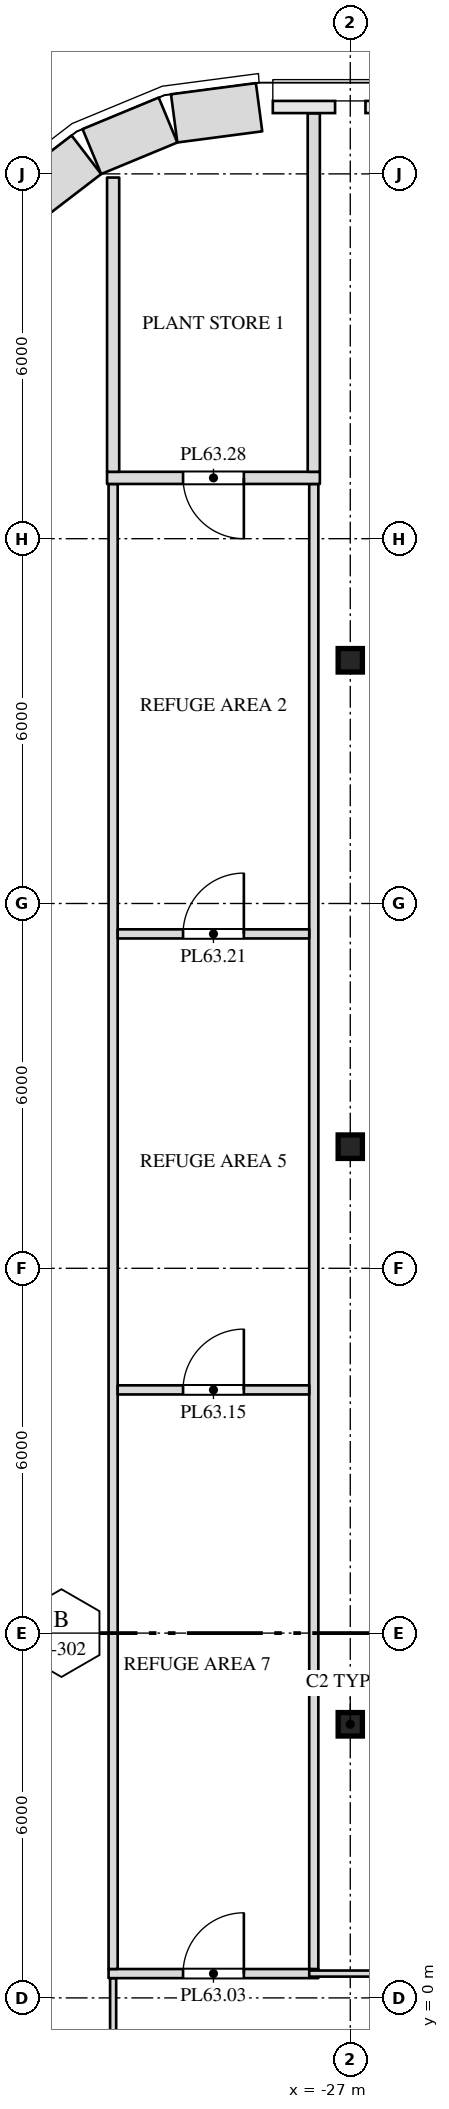
"""IFC4 building model, lengths in metres.
Left out: names, types, materials, properties, quantities, classifications, styles, units other than length and angle.
Written with IfcOpenShell. Run it as: python <this file> out.ifc"""

import sys

from ifc_helpers import new_model, si_unit, direction, frame, frame_2d, origin, origin_2d, place, context, subcontext, project, spatial, rectangle, i_section, extrude, element, fill, save


model = new_model("IFC4")
c1 = context("Model", 3, precision=1e-05, world=origin(), true_north=direction((0.0, 1.0)))
c2 = subcontext(c1, "Body", "Model", "MODEL_VIEW")
j1 = project(units=[si_unit("LENGTHUNIT", "METRE"), si_unit("PLANEANGLEUNIT", "RADIAN")], contexts=[c1])
p1 = place(None, origin())
s1 = spatial("IfcSite", under=j1, at=p1, CompositionType="ELEMENT")
p2 = place(p1, origin())
s2 = spatial("IfcBuilding", under=s1, at=p2, CompositionType="ELEMENT")
p3 = place(p2, frame((0.0, 0.0, 268.5)))
s3 = spatial("IfcBuildingStorey", under=s2, at=p3, CompositionType="ELEMENT", Elevation=268.5)
for number, where, z_axis, x_axis in (
    (1, (-27.0, 4.5, 0.0), (0.0, 0.0, 1.0), (1.0, 0.0, 0.0)),
    (2, (-27.0, 14.0, 0.0), (0.0, 0.0, 1.0), (1.0, 0.0, 0.0)),
    (3, (-27.0, 22.0, 0.0), (0.0, 0.0, 1.0), (1.0, 0.0, 0.0)),
):
    element("IfcColumn", number, at=place(p3, frame(where, z_axis=z_axis, x_axis=x_axis)), inside=s3, PredefinedType="COLUMN", context=c2, shape_type="SweptSolid", body=[
        extrude(i_section(OverallWidth=0.399, OverallDepth=0.386, WebThickness=0.021, FlangeThickness=0.033, at=origin_2d()), origin(), (0.0, 0.0, 1.0), 4.0),
    ])
p4 = place(p3, frame((-30.9, -1.925, 0.0), z_axis=(0.0, 0.0, 1.0), x_axis=(0.0, 1.0, 0.0)))
e4 = element("IfcWall", 4, at=p4, inside=s3, PredefinedType="PARTITIONING", context=c2, shape_type="SweptSolid", body=[
    extrude(rectangle(XDim=2.25, YDim=0.1, at=frame_2d((1.125, 0.0))), origin(), (0.0, 0.0, 1.0), 3.78),
])
p5 = place(p3, frame((-30.975, 0.4, 0.0), z_axis=(0.0, 0.0, 1.0), x_axis=(1.0, 0.0, 0.0)))
e5 = element("IfcWall", 5, at=p5, inside=s3, PredefinedType="PARTITIONING", context=c2, shape_type="SweptSolid", body=[
    extrude(rectangle(XDim=3.45, YDim=0.15, at=frame_2d((1.725, 0.0))), origin(), (0.0, 0.0, 1.0), 3.78),
])
p6 = place(p5, frame((1.225, 0.0, 0.0)))
e6 = element("IfcOpeningElement", 6, at=p6, cuts=e5, PredefinedType="OPENING", context=c2, shape_type="SweptSolid", body=[
    extrude(rectangle(XDim=1.0, YDim=2.1, at=frame_2d((0.5, 1.05))), frame((0.0, 0.087, 0.0), z_axis=(0.0, -1.0, 0.0), x_axis=(1.0, 0.0, 0.0)), (0.0, 0.0, 1.0), 0.174),
])
p7 = place(p3, frame((-30.9, 0.475, 0.0), z_axis=(0.0, 0.0, 1.0), x_axis=(0.0, 1.0, 0.0)))
e7 = element("IfcWall", 7, at=p7, inside=s3, PredefinedType="PARTITIONING", context=c2, shape_type="SweptSolid", body=[
    extrude(rectangle(XDim=24.425, YDim=0.15, at=frame_2d((12.212, 0.0))), origin(), (0.0, 0.0, 1.0), 3.78),
])
p8 = place(p3, frame((-27.675, 0.4, 0.0), z_axis=(0.0, 0.0, 1.0), x_axis=(1.0, 0.0, 0.0)))
e8 = element("IfcWall", 8, at=p8, inside=s3, PredefinedType="PARTITIONING", context=c2, shape_type="SweptSolid", body=[
    extrude(rectangle(XDim=1.435, YDim=0.1, at=frame_2d((0.718, 0.0))), origin(), (0.0, 0.0, 1.0), 3.78),
])
p9 = place(p3, frame((-27.6, 0.475, 0.0), z_axis=(0.0, 0.0, 1.0), x_axis=(0.0, 1.0, 0.0)))
e9 = element("IfcWall", 9, at=p9, inside=s3, PredefinedType="PARTITIONING", context=c2, shape_type="SweptSolid", body=[
    extrude(rectangle(XDim=24.425, YDim=0.15, at=frame_2d((12.212, 0.0))), origin(), (0.0, 0.0, 1.0), 3.78),
])
p10 = place(p3, frame((-30.825, 10.0, 0.0), z_axis=(0.0, 0.0, 1.0), x_axis=(1.0, 0.0, 0.0)))
e10 = element("IfcWall", 10, at=p10, inside=s3, PredefinedType="PARTITIONING", context=c2, shape_type="SweptSolid", body=[
    extrude(rectangle(XDim=3.15, YDim=0.15, at=frame_2d((1.575, 0.0))), origin(), (0.0, 0.0, 1.0), 3.78),
])
p11 = place(p10, frame((1.075, 0.0, 0.0)))
e11 = element("IfcOpeningElement", 11, at=p11, cuts=e10, PredefinedType="OPENING", context=c2, shape_type="SweptSolid", body=[
    extrude(rectangle(XDim=1.0, YDim=2.1, at=frame_2d((0.5, 1.05))), frame((0.0, 0.087, 0.0), z_axis=(0.0, -1.0, 0.0), x_axis=(1.0, 0.0, 0.0)), (0.0, 0.0, 1.0), 0.174),
])
p12 = place(p3, frame((-30.825, 17.5, 0.0), z_axis=(0.0, 0.0, 1.0), x_axis=(1.0, 0.0, 0.0)))
e12 = element("IfcWall", 12, at=p12, inside=s3, PredefinedType="PARTITIONING", context=c2, shape_type="SweptSolid", body=[
    extrude(rectangle(XDim=3.15, YDim=0.15, at=frame_2d((1.575, 0.0))), origin(), (0.0, 0.0, 1.0), 3.78),
])
p13 = place(p12, frame((1.075, 0.0, 0.0)))
e13 = element("IfcOpeningElement", 13, at=p13, cuts=e12, PredefinedType="OPENING", context=c2, shape_type="SweptSolid", body=[
    extrude(rectangle(XDim=1.0, YDim=2.1, at=frame_2d((0.5, 1.05))), frame((0.0, 0.087, 0.0), z_axis=(0.0, -1.0, 0.0), x_axis=(1.0, 0.0, 0.0)), (0.0, 0.0, 1.0), 0.174),
])
p14 = place(p3, frame((-31.0, 25.0, 0.0), z_axis=(0.0, 0.0, 1.0), x_axis=(1.0, 0.0, 0.0)))
e14 = element("IfcWall", 14, at=p14, inside=s3, PredefinedType="PARTITIONING", context=c2, shape_type="SweptSolid", body=[
    extrude(rectangle(XDim=3.5, YDim=0.2, at=frame_2d((1.75, 0.0))), origin(), (0.0, 0.0, 1.0), 3.78),
])
p15 = place(p14, frame((1.25, 0.0, 0.0)))
e15 = element("IfcOpeningElement", 15, at=p15, cuts=e14, PredefinedType="OPENING", context=c2, shape_type="SweptSolid", body=[
    extrude(rectangle(XDim=1.0, YDim=2.1, at=frame_2d((0.5, 1.05))), frame((0.0, 0.112, 0.0), z_axis=(0.0, -1.0, 0.0), x_axis=(1.0, 0.0, 0.0)), (0.0, 0.0, 1.0), 0.224),
])
p16 = place(p3, frame((-30.9, 25.1, 0.0), z_axis=(0.0, 0.0, 1.0), x_axis=(0.0, 1.0, 0.0)))
e16 = element("IfcWall", 16, at=p16, inside=s3, PredefinedType="PARTITIONING", context=c2, shape_type="SweptSolid", body=[
    extrude(rectangle(XDim=4.84, YDim=0.2, at=frame_2d((2.42, 0.0))), origin(), (0.0, 0.0, 1.0), 3.78),
])
p17 = place(p3, frame((-27.6, 25.1, 0.0), z_axis=(0.0, 0.0, 1.0), x_axis=(0.0, 1.0, 0.0)))
e17 = element("IfcWall", 17, at=p17, inside=s3, PredefinedType="PARTITIONING", context=c2, shape_type="SweptSolid", body=[
    extrude(rectangle(XDim=5.896, YDim=0.2, at=frame_2d((2.948, 0.0))), origin(), (0.0, 0.0, 1.0), 3.78),
])
p18 = place(p3, frame((-28.5, 31.097, 0.0), z_axis=(0.0, 0.0, 1.0), x_axis=(-0.99144603414, -0.130517283865, 0.0)))
e18 = element("IfcWall", 18, at=p18, inside=s3, PredefinedType="SOLIDWALL", context=c2, shape_type="SweptSolid", body=[
    extrude(rectangle(XDim=1.408, YDim=0.8, at=frame_2d((0.704, 0.0))), origin(), (0.0, 0.0, 1.0), 3.78),
])
p19 = place(p3, frame((-29.997, 30.886, 0.0), z_axis=(0.0, 0.0, 1.0), x_axis=(-0.923847774587, -0.38276009378, 0.0)))
e19 = element("IfcWall", 19, at=p19, inside=s3, PredefinedType="SOLIDWALL", context=c2, shape_type="SweptSolid", body=[
    extrude(rectangle(XDim=1.355, YDim=0.8, at=frame_2d((0.678, 0.0))), origin(), (0.0, 0.0, 1.0), 3.78),
])
p20 = place(p3, frame((-31.34, 30.315, 0.0), z_axis=(0.0, 0.0, 1.0), x_axis=(-0.793272915452, -0.608866226366, 0.0)))
e20 = element("IfcWall", 20, at=p20, inside=s3, PredefinedType="SOLIDWALL", context=c2, shape_type="SweptSolid", body=[
    extrude(rectangle(XDim=1.356, YDim=0.8, at=frame_2d((0.678, 0.0))), origin(), (0.0, 0.0, 1.0), 3.78),
])
p21 = place(p6, origin())
e21 = element("IfcDoor", 21, at=p21, inside=s3, OperationType="SINGLE_SWING_RIGHT", PredefinedType="DOOR", context=c2, shape_type="SweptSolid", body=[
    extrude(rectangle(XDim=1.0, YDim=2.1, at=frame_2d((0.5, 1.05))), frame((0.0, 0.025, 0.0), z_axis=(0.0, -1.0, 0.0), x_axis=(1.0, 0.0, 0.0)), (0.0, 0.0, 1.0), 0.05),
])
fill(e6, e21)
p22 = place(p11, origin())
e22 = element("IfcDoor", 22, at=p22, inside=s3, OperationType="SINGLE_SWING_RIGHT", PredefinedType="DOOR", context=c2, shape_type="SweptSolid", body=[
    extrude(rectangle(XDim=1.0, YDim=2.1, at=frame_2d((0.5, 1.05))), frame((0.0, 0.025, 0.0), z_axis=(0.0, -1.0, 0.0), x_axis=(1.0, 0.0, 0.0)), (0.0, 0.0, 1.0), 0.05),
])
fill(e11, e22)
p23 = place(p13, origin())
e23 = element("IfcDoor", 23, at=p23, inside=s3, OperationType="SINGLE_SWING_RIGHT", PredefinedType="DOOR", context=c2, shape_type="SweptSolid", body=[
    extrude(rectangle(XDim=1.0, YDim=2.1, at=frame_2d((0.5, 1.05))), frame((0.0, 0.025, 0.0), z_axis=(0.0, -1.0, 0.0), x_axis=(1.0, 0.0, 0.0)), (0.0, 0.0, 1.0), 0.05),
])
fill(e13, e23)
p24 = place(p15, origin())
e24 = element("IfcDoor", 24, at=p24, inside=s3, OperationType="SINGLE_SWING_LEFT", PredefinedType="DOOR", context=c2, shape_type="SweptSolid", body=[
    extrude(rectangle(XDim=1.0, YDim=2.1, at=frame_2d((0.5, 1.05))), frame((0.0, 0.025, 0.0), z_axis=(0.0, -1.0, 0.0), x_axis=(1.0, 0.0, 0.0)), (0.0, 0.0, 1.0), 0.05),
])
fill(e15, e24)
save(model, sys.argv[1])
